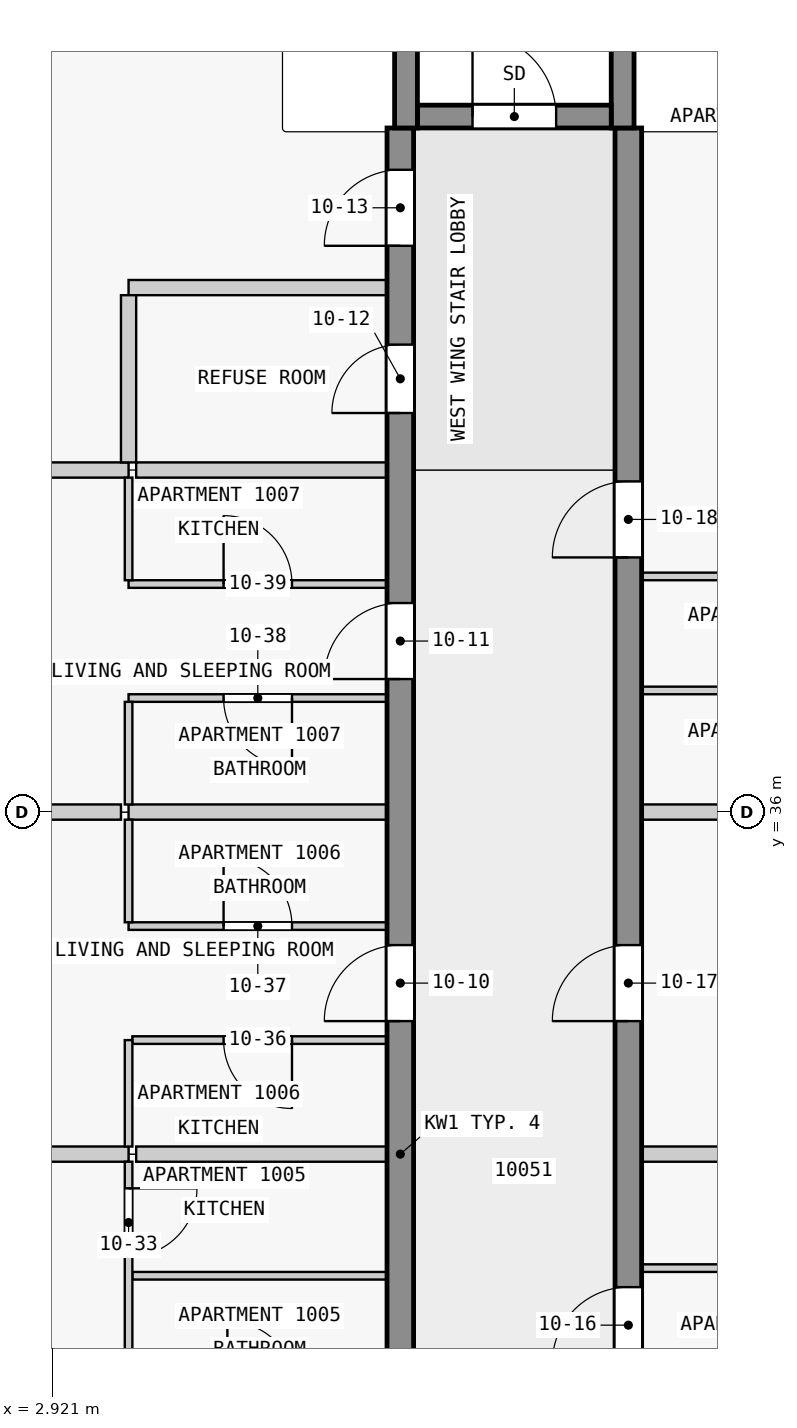
"""IFC4 building model, lengths in metres.
Left out: names, types, materials, properties, quantities, classifications, styles, units other than length and angle.
Written with IfcOpenShell. Run it as: python <this file> out.ifc"""

import sys

from ifc_helpers import new_model, si_unit, direction, frame, frame_2d, origin, place, context, subcontext, project, spatial, rectangle, extrude, element, fill, save


model = new_model("IFC4")
c1 = context("Model", 3, precision=1e-05, world=origin(), true_north=direction((0.0, 1.0)))
c2 = subcontext(c1, "Body", "Model", "MODEL_VIEW")
j1 = project(units=[si_unit("LENGTHUNIT", "METRE"), si_unit("PLANEANGLEUNIT", "RADIAN")], contexts=[c1])
p1 = place(None, origin())
s1 = spatial("IfcSite", under=j1, at=p1, CompositionType="ELEMENT")
p2 = place(p1, origin())
s2 = spatial("IfcBuilding", under=s1, at=p2, CompositionType="ELEMENT")
p3 = place(p2, frame((0.0, 0.0, 44.3)))
s3 = spatial("IfcBuildingStorey", under=s2, at=p3, CompositionType="ELEMENT", Elevation=44.3)
p4 = place(p3, frame((7.725, 45.15, 0.0), z_axis=(0.0, 0.0, 1.0), x_axis=(1.0, 0.0, 0.0)))
e1 = element("IfcWall", 1, at=p4, inside=s3, PredefinedType="SHEAR", context=c2, shape_type="SweptSolid", body=[
    extrude(rectangle(XDim=2.55, YDim=0.3, at=frame_2d((1.275, 0.0))), origin(), (0.0, 0.0, 1.0), 3.5),
])
p5 = place(p4, frame((0.725, 0.0, 0.0)))
e2 = element("IfcOpeningElement", 2, at=p5, cuts=e1, PredefinedType="OPENING", context=c2, shape_type="SweptSolid", body=[
    extrude(rectangle(XDim=1.1, YDim=2.1, at=frame_2d((0.55, 1.05))), frame((0.0, 0.16, 0.0), z_axis=(0.0, -1.0, 0.0), x_axis=(1.0, 0.0, 0.0)), (0.0, 0.0, 1.0), 0.32),
])
for number, where, z_axis, x_axis in (
    (3, (7.575, 45.0, 0.0), (0.0, 0.0, 1.0), (0.0, 1.0, 0.0)),
    (4, (10.425, 45.0, 0.0), (0.0, 0.0, 1.0), (0.0, 1.0, 0.0)),
):
    element("IfcWall", number, at=place(p3, frame(where, z_axis=z_axis, x_axis=x_axis)), inside=s3, PredefinedType="SHEAR", context=c2, shape_type="SweptSolid", body=[
        extrude(rectangle(XDim=7.2, YDim=0.3, at=frame_2d((3.6, 0.0))), origin(), (0.0, 0.0, 1.0), 3.5),
    ])
p6 = place(p3, frame((7.5, 18.0, 0.0), z_axis=(0.0, 0.0, 1.0), x_axis=(0.0, 1.0, 0.0)))
e5 = element("IfcWall", 5, at=p6, inside=s3, PredefinedType="SHEAR", context=c2, shape_type="SweptSolid", body=[
    extrude(rectangle(XDim=27.0, YDim=0.35, at=frame_2d((13.5, 0.0))), origin(), (0.0, 0.0, 1.0), 3.25),
])
p7 = place(p6, frame((4.75, 0.0, 0.0)))
e6 = element("IfcOpeningElement", 6, at=p7, cuts=e5, PredefinedType="OPENING", context=c2, shape_type="SweptSolid", body=[
    extrude(rectangle(XDim=1.0, YDim=2.1, at=frame_2d((0.5, 1.05))), frame((0.0, 0.185, 0.0), z_axis=(0.0, -1.0, 0.0), x_axis=(1.0, 0.0, 0.0)), (0.0, 0.0, 1.0), 0.37),
])
p8 = place(p6, frame((15.25, 0.0, 0.0)))
e7 = element("IfcOpeningElement", 7, at=p8, cuts=e5, PredefinedType="OPENING", context=c2, shape_type="SweptSolid", body=[
    extrude(rectangle(XDim=1.0, YDim=2.1, at=frame_2d((0.5, 1.05))), frame((0.0, 0.185, 0.0), z_axis=(0.0, -1.0, 0.0), x_axis=(1.0, 0.0, 0.0)), (0.0, 0.0, 1.0), 0.37),
])
p9 = place(p6, frame((19.75, 0.0, 0.0)))
e8 = element("IfcOpeningElement", 8, at=p9, cuts=e5, PredefinedType="OPENING", context=c2, shape_type="SweptSolid", body=[
    extrude(rectangle(XDim=1.0, YDim=2.1, at=frame_2d((0.5, 1.05))), frame((0.0, 0.185, 0.0), z_axis=(0.0, -1.0, 0.0), x_axis=(1.0, 0.0, 0.0)), (0.0, 0.0, 1.0), 0.37),
])
p10 = place(p6, frame((23.25, 0.0, 0.0)))
e9 = element("IfcOpeningElement", 9, at=p10, cuts=e5, PredefinedType="OPENING", context=c2, shape_type="SweptSolid", body=[
    extrude(rectangle(XDim=0.9, YDim=2.1, at=frame_2d((0.45, 1.05))), frame((0.0, 0.185, 0.0), z_axis=(0.0, -1.0, 0.0), x_axis=(1.0, 0.0, 0.0)), (0.0, 0.0, 1.0), 0.37),
])
p11 = place(p6, frame((25.45, 0.0, 0.0)))
e10 = element("IfcOpeningElement", 10, at=p11, cuts=e5, PredefinedType="OPENING", context=c2, shape_type="SweptSolid", body=[
    extrude(rectangle(XDim=1.0, YDim=2.1, at=frame_2d((0.5, 1.05))), frame((0.0, 0.185, 0.0), z_axis=(0.0, -1.0, 0.0), x_axis=(1.0, 0.0, 0.0)), (0.0, 0.0, 1.0), 0.37),
])
p12 = place(p3, frame((10.5, 18.0, 0.0), z_axis=(0.0, 0.0, 1.0), x_axis=(0.0, 1.0, 0.0)))
e11 = element("IfcWall", 11, at=p12, inside=s3, PredefinedType="SHEAR", context=c2, shape_type="SweptSolid", body=[
    extrude(rectangle(XDim=27.0, YDim=0.35, at=frame_2d((13.5, 0.0))), origin(), (0.0, 0.0, 1.0), 3.25),
])
p13 = place(p12, frame((1.75, 0.0, 0.0)))
e12 = element("IfcOpeningElement", 12, at=p13, cuts=e11, PredefinedType="OPENING", context=c2, shape_type="SweptSolid", body=[
    extrude(rectangle(XDim=1.0, YDim=2.1, at=frame_2d((0.5, 1.05))), frame((0.0, 0.185, 0.0), z_axis=(0.0, -1.0, 0.0), x_axis=(1.0, 0.0, 0.0)), (0.0, 0.0, 1.0), 0.37),
])
p14 = place(p12, frame((6.25, 0.0, 0.0)))
e13 = element("IfcOpeningElement", 13, at=p14, cuts=e11, PredefinedType="OPENING", context=c2, shape_type="SweptSolid", body=[
    extrude(rectangle(XDim=1.0, YDim=2.1, at=frame_2d((0.5, 1.05))), frame((0.0, 0.185, 0.0), z_axis=(0.0, -1.0, 0.0), x_axis=(1.0, 0.0, 0.0)), (0.0, 0.0, 1.0), 0.37),
])
p15 = place(p12, frame((10.75, 0.0, 0.0)))
e14 = element("IfcOpeningElement", 14, at=p15, cuts=e11, PredefinedType="OPENING", context=c2, shape_type="SweptSolid", body=[
    extrude(rectangle(XDim=1.0, YDim=2.1, at=frame_2d((0.5, 1.05))), frame((0.0, 0.185, 0.0), z_axis=(0.0, -1.0, 0.0), x_axis=(1.0, 0.0, 0.0)), (0.0, 0.0, 1.0), 0.37),
])
p16 = place(p12, frame((15.25, 0.0, 0.0)))
e15 = element("IfcOpeningElement", 15, at=p16, cuts=e11, PredefinedType="OPENING", context=c2, shape_type="SweptSolid", body=[
    extrude(rectangle(XDim=1.0, YDim=2.1, at=frame_2d((0.5, 1.05))), frame((0.0, 0.185, 0.0), z_axis=(0.0, -1.0, 0.0), x_axis=(1.0, 0.0, 0.0)), (0.0, 0.0, 1.0), 0.37),
])
p17 = place(p12, frame((21.35, 0.0, 0.0)))
e16 = element("IfcOpeningElement", 16, at=p17, cuts=e11, PredefinedType="OPENING", context=c2, shape_type="SweptSolid", body=[
    extrude(rectangle(XDim=1.0, YDim=2.1, at=frame_2d((0.5, 1.05))), frame((0.0, 0.185, 0.0), z_axis=(0.0, -1.0, 0.0), x_axis=(1.0, 0.0, 0.0)), (0.0, 0.0, 1.0), 0.37),
])
p18 = place(p3, frame((7.325, 29.9, 0.0), z_axis=(0.0, 0.0, 1.0), x_axis=(-1.0, 0.0, 0.0)))
e17 = element("IfcWall", 17, at=p18, inside=s3, PredefinedType="PARTITIONING", context=c2, shape_type="SweptSolid", body=[
    extrude(rectangle(XDim=3.35, YDim=0.1, at=frame_2d((1.675, 0.0))), origin(), (0.0, 0.0, 1.0), 3.25),
])
p19 = place(p3, frame((10.675, 30.0, 0.0), z_axis=(0.0, 0.0, 1.0), x_axis=(1.0, 0.0, 0.0)))
e18 = element("IfcWall", 18, at=p19, inside=s3, PredefinedType="PARTITIONING", context=c2, shape_type="SweptSolid", body=[
    extrude(rectangle(XDim=3.4, YDim=0.1, at=frame_2d((1.7, 0.0))), origin(), (0.0, 0.0, 1.0), 3.25),
])
p20 = place(p19, frame((1.25, 0.0, 0.0)))
e19 = element("IfcOpeningElement", 19, at=p20, cuts=e18, PredefinedType="OPENING", context=c2, shape_type="SweptSolid", body=[
    extrude(rectangle(XDim=0.9, YDim=2.1, at=frame_2d((0.45, 1.05))), frame((0.0, 0.06, 0.0), z_axis=(0.0, -1.0, 0.0), x_axis=(1.0, 0.0, 0.0)), (0.0, 0.0, 1.0), 0.12),
])
for number, where, z_axis, x_axis in (
    (20, (7.325, 31.5, 0.0), (0.0, 0.0, 1.0), (-1.0, 0.0, 0.0)),
    (21, (13.975, 31.5, 0.0), (0.0, 0.0, 1.0), (-1.0, 0.0, 0.0)),
):
    element("IfcWall", number, at=place(p3, frame(where, z_axis=z_axis, x_axis=x_axis)), inside=s3, PredefinedType="PARTITIONING", context=c2, shape_type="SweptSolid", body=[
        extrude(rectangle(XDim=3.3, YDim=0.2, at=frame_2d((1.65, 0.0))), origin(), (0.0, 0.0, 1.0), 3.25),
    ])
p21 = place(p3, frame((0.15, 31.5, 0.0), z_axis=(0.0, 0.0, 1.0), x_axis=(1.0, 0.0, 0.0)))
e22 = element("IfcWall", 22, at=p21, inside=s3, PredefinedType="PARTITIONING", context=c2, shape_type="SweptSolid", body=[
    extrude(rectangle(XDim=3.775, YDim=0.2, at=frame_2d((1.888, 0.0))), origin(), (0.0, 0.0, 1.0), 3.25),
])
p22 = place(p3, frame((7.325, 33.0, 0.0), z_axis=(0.0, 0.0, 1.0), x_axis=(-1.0, 0.0, 0.0)))
e23 = element("IfcWall", 23, at=p22, inside=s3, PredefinedType="PARTITIONING", context=c2, shape_type="SweptSolid", body=[
    extrude(rectangle(XDim=3.35, YDim=0.1, at=frame_2d((1.675, 0.0))), origin(), (0.0, 0.0, 1.0), 3.25),
])
p23 = place(p22, frame((1.25, 0.0, 0.0)))
e24 = element("IfcOpeningElement", 24, at=p23, cuts=e23, PredefinedType="OPENING", context=c2, shape_type="SweptSolid", body=[
    extrude(rectangle(XDim=0.9, YDim=2.1, at=frame_2d((0.45, 1.05))), frame((0.0, 0.06, 0.0), z_axis=(0.0, -1.0, 0.0), x_axis=(1.0, 0.0, 0.0)), (0.0, 0.0, 1.0), 0.12),
])
p24 = place(p3, frame((3.925, 34.5, 0.0), z_axis=(0.0, 0.0, 1.0), x_axis=(1.0, 0.0, 0.0)))
e25 = element("IfcWall", 25, at=p24, inside=s3, PredefinedType="PARTITIONING", context=c2, shape_type="SweptSolid", body=[
    extrude(rectangle(XDim=3.4, YDim=0.1, at=frame_2d((1.7, 0.0))), origin(), (0.0, 0.0, 1.0), 3.25),
])
p25 = place(p24, frame((1.25, 0.0, 0.0)))
e26 = element("IfcOpeningElement", 26, at=p25, cuts=e25, PredefinedType="OPENING", context=c2, shape_type="SweptSolid", body=[
    extrude(rectangle(XDim=0.9, YDim=2.1, at=frame_2d((0.45, 1.05))), frame((0.0, 0.06, 0.0), z_axis=(0.0, -1.0, 0.0), x_axis=(1.0, 0.0, 0.0)), (0.0, 0.0, 1.0), 0.12),
])
p26 = place(p3, frame((7.325, 36.0, 0.0), z_axis=(0.0, 0.0, 1.0), x_axis=(-1.0, 0.0, 0.0)))
e27 = element("IfcWall", 27, at=p26, inside=s3, PredefinedType="PARTITIONING", context=c2, shape_type="SweptSolid", body=[
    extrude(rectangle(XDim=3.4, YDim=0.2, at=frame_2d((1.7, 0.0))), origin(), (0.0, 0.0, 1.0), 3.25),
])
p27 = place(p3, frame((16.6, 36.0, 0.0), z_axis=(0.0, 0.0, 1.0), x_axis=(-1.0, 0.0, 0.0)))
e28 = element("IfcWall", 28, at=p27, inside=s3, PredefinedType="PARTITIONING", context=c2, shape_type="SweptSolid", body=[
    extrude(rectangle(XDim=5.925, YDim=0.2, at=frame_2d((2.962, 0.0))), origin(), (0.0, 0.0, 1.0), 3.25),
])
p28 = place(p3, frame((1.4, 36.0, 0.0), z_axis=(0.0, 0.0, 1.0), x_axis=(1.0, 0.0, 0.0)))
e29 = element("IfcWall", 29, at=p28, inside=s3, PredefinedType="PARTITIONING", context=c2, shape_type="SweptSolid", body=[
    extrude(rectangle(XDim=2.425, YDim=0.2, at=frame_2d((1.212, 0.0))), origin(), (0.0, 0.0, 1.0), 3.25),
])
p29 = place(p3, frame((7.325, 37.5, 0.0), z_axis=(0.0, 0.0, 1.0), x_axis=(-1.0, 0.0, 0.0)))
e30 = element("IfcWall", 30, at=p29, inside=s3, PredefinedType="PARTITIONING", context=c2, shape_type="SweptSolid", body=[
    extrude(rectangle(XDim=3.4, YDim=0.1, at=frame_2d((1.7, 0.0))), origin(), (0.0, 0.0, 1.0), 3.25),
])
p30 = place(p29, frame((1.25, 0.0, 0.0)))
e31 = element("IfcOpeningElement", 31, at=p30, cuts=e30, PredefinedType="OPENING", context=c2, shape_type="SweptSolid", body=[
    extrude(rectangle(XDim=0.9, YDim=2.1, at=frame_2d((0.45, 1.05))), frame((0.0, 0.06, 0.0), z_axis=(0.0, -1.0, 0.0), x_axis=(1.0, 0.0, 0.0)), (0.0, 0.0, 1.0), 0.12),
])
p31 = place(p3, frame((14.075, 37.6, 0.0), z_axis=(0.0, 0.0, 1.0), x_axis=(-1.0, 0.0, 0.0)))
e32 = element("IfcWall", 32, at=p31, inside=s3, PredefinedType="PARTITIONING", context=c2, shape_type="SweptSolid", body=[
    extrude(rectangle(XDim=3.4, YDim=0.1, at=frame_2d((1.7, 0.0))), origin(), (0.0, 0.0, 1.0), 3.25),
])
p32 = place(p3, frame((3.925, 39.0, 0.0), z_axis=(0.0, 0.0, 1.0), x_axis=(1.0, 0.0, 0.0)))
e33 = element("IfcWall", 33, at=p32, inside=s3, PredefinedType="PARTITIONING", context=c2, shape_type="SweptSolid", body=[
    extrude(rectangle(XDim=3.4, YDim=0.1, at=frame_2d((1.7, 0.0))), origin(), (0.0, 0.0, 1.0), 3.25),
])
p33 = place(p32, frame((1.25, 0.0, 0.0)))
e34 = element("IfcOpeningElement", 34, at=p33, cuts=e33, PredefinedType="OPENING", context=c2, shape_type="SweptSolid", body=[
    extrude(rectangle(XDim=0.9, YDim=2.1, at=frame_2d((0.45, 1.05))), frame((0.0, 0.06, 0.0), z_axis=(0.0, -1.0, 0.0), x_axis=(1.0, 0.0, 0.0)), (0.0, 0.0, 1.0), 0.12),
])
p34 = place(p3, frame((14.075, 39.1, 0.0), z_axis=(0.0, 0.0, 1.0), x_axis=(-1.0, 0.0, 0.0)))
e35 = element("IfcWall", 35, at=p34, inside=s3, PredefinedType="PARTITIONING", context=c2, shape_type="SweptSolid", body=[
    extrude(rectangle(XDim=3.4, YDim=0.1, at=frame_2d((1.7, 0.0))), origin(), (0.0, 0.0, 1.0), 3.25),
])
p35 = place(p34, frame((1.25, 0.0, 0.0)))
e36 = element("IfcOpeningElement", 36, at=p35, cuts=e35, PredefinedType="OPENING", context=c2, shape_type="SweptSolid", body=[
    extrude(rectangle(XDim=0.9, YDim=2.1, at=frame_2d((0.45, 1.05))), frame((0.0, 0.06, 0.0), z_axis=(0.0, -1.0, 0.0), x_axis=(1.0, 0.0, 0.0)), (0.0, 0.0, 1.0), 0.12),
])
p36 = place(p3, frame((7.325, 40.5, 0.0), z_axis=(0.0, 0.0, 1.0), x_axis=(-1.0, 0.0, 0.0)))
e37 = element("IfcWall", 37, at=p36, inside=s3, PredefinedType="PARTITIONING", context=c2, shape_type="SweptSolid", body=[
    extrude(rectangle(XDim=3.3, YDim=0.2, at=frame_2d((1.65, 0.0))), origin(), (0.0, 0.0, 1.0), 3.25),
])
p37 = place(p3, frame((-0.08, 40.5, 0.0), z_axis=(0.0, 0.0, 1.0), x_axis=(1.0, 0.0, 0.0)))
e38 = element("IfcWall", 38, at=p37, inside=s3, PredefinedType="PARTITIONING", context=c2, shape_type="SweptSolid", body=[
    extrude(rectangle(XDim=4.005, YDim=0.2, at=frame_2d((2.002, 0.0))), origin(), (0.0, 0.0, 1.0), 3.25),
])
p38 = place(p3, frame((7.325, 42.9, 0.0), z_axis=(0.0, 0.0, 1.0), x_axis=(-1.0, 0.0, 0.0)))
e39 = element("IfcWall", 39, at=p38, inside=s3, PredefinedType="PARTITIONING", context=c2, shape_type="SweptSolid", body=[
    extrude(rectangle(XDim=3.4, YDim=0.2, at=frame_2d((1.7, 0.0))), origin(), (0.0, 0.0, 1.0), 3.25),
])
p39 = place(p3, frame((3.925, 31.4, 0.0), z_axis=(0.0, 0.0, 1.0), x_axis=(0.0, -1.0, 0.0)))
e40 = element("IfcWall", 40, at=p39, inside=s3, PredefinedType="PARTITIONING", context=c2, shape_type="SweptSolid", body=[
    extrude(rectangle(XDim=3.0, YDim=0.1, at=frame_2d((1.5, 0.0))), origin(), (0.0, 0.0, 1.0), 3.25),
])
p40 = place(p39, frame((0.35, 0.0, 0.0)))
e41 = element("IfcOpeningElement", 41, at=p40, cuts=e40, PredefinedType="OPENING", context=c2, shape_type="SweptSolid", body=[
    extrude(rectangle(XDim=0.9, YDim=2.1, at=frame_2d((0.45, 1.05))), frame((0.0, 0.06, 0.0), z_axis=(0.0, -1.0, 0.0), x_axis=(1.0, 0.0, 0.0)), (0.0, 0.0, 1.0), 0.12),
])
p41 = place(p3, frame((3.925, 33.0, 0.0), z_axis=(0.0, 0.0, 1.0), x_axis=(0.0, -1.0, 0.0)))
e42 = element("IfcWall", 42, at=p41, inside=s3, PredefinedType="PARTITIONING", context=c2, shape_type="SweptSolid", body=[
    extrude(rectangle(XDim=1.4, YDim=0.1, at=frame_2d((0.7, 0.0))), origin(), (0.0, 0.0, 1.0), 3.25),
])
for number, where, z_axis, x_axis in (
    (43, (3.925, 35.9, 0.0), (0.0, 0.0, 1.0), (0.0, -1.0, 0.0)),
    (44, (3.925, 37.45, 0.0), (0.0, 0.0, 1.0), (0.0, -1.0, 0.0)),
    (45, (3.925, 40.4, 0.0), (0.0, 0.0, 1.0), (0.0, -1.0, 0.0)),
):
    element("IfcWall", number, at=place(p3, frame(where, z_axis=z_axis, x_axis=x_axis)), inside=s3, PredefinedType="PARTITIONING", context=c2, shape_type="SweptSolid", body=[
        extrude(rectangle(XDim=1.35, YDim=0.1, at=frame_2d((0.675, 0.0))), origin(), (0.0, 0.0, 1.0), 3.25),
    ])
p42 = place(p3, frame((3.925, 42.8, 0.0), z_axis=(0.0, 0.0, 1.0), x_axis=(0.0, -1.0, 0.0)))
e46 = element("IfcWall", 46, at=p42, inside=s3, PredefinedType="PARTITIONING", context=c2, shape_type="SweptSolid", body=[
    extrude(rectangle(XDim=2.2, YDim=0.2, at=frame_2d((1.1, 0.0))), origin(), (0.0, 0.0, 1.0), 3.25),
])
p43 = place(p5, origin())
e47 = element("IfcDoor", 47, at=p43, inside=s3, OperationType="SINGLE_SWING_LEFT", PredefinedType="DOOR", context=c2, shape_type="SweptSolid", body=[
    extrude(rectangle(XDim=1.1, YDim=2.1, at=frame_2d((0.55, 1.05))), frame((0.0, 0.025, 0.0), z_axis=(0.0, -1.0, 0.0), x_axis=(1.0, 0.0, 0.0)), (0.0, 0.0, 1.0), 0.05),
])
fill(e2, e47)
p44 = place(p8, origin())
e48 = element("IfcDoor", 48, at=p44, inside=s3, OperationType="SINGLE_SWING_RIGHT", PredefinedType="DOOR", context=c2, shape_type="SweptSolid", body=[
    extrude(rectangle(XDim=1.0, YDim=2.1, at=frame_2d((0.5, 1.05))), frame((0.0, 0.025, 0.0), z_axis=(0.0, -1.0, 0.0), x_axis=(1.0, 0.0, 0.0)), (0.0, 0.0, 1.0), 0.05),
])
fill(e7, e48)
p45 = place(p9, origin())
e49 = element("IfcDoor", 49, at=p45, inside=s3, OperationType="SINGLE_SWING_RIGHT", PredefinedType="DOOR", context=c2, shape_type="SweptSolid", body=[
    extrude(rectangle(XDim=1.0, YDim=2.1, at=frame_2d((0.5, 1.05))), frame((0.0, 0.025, 0.0), z_axis=(0.0, -1.0, 0.0), x_axis=(1.0, 0.0, 0.0)), (0.0, 0.0, 1.0), 0.05),
])
fill(e8, e49)
p46 = place(p10, origin())
e50 = element("IfcDoor", 50, at=p46, inside=s3, OperationType="SINGLE_SWING_RIGHT", PredefinedType="DOOR", context=c2, shape_type="SweptSolid", body=[
    extrude(rectangle(XDim=0.9, YDim=2.1, at=frame_2d((0.45, 1.05))), frame((0.0, 0.025, 0.0), z_axis=(0.0, -1.0, 0.0), x_axis=(1.0, 0.0, 0.0)), (0.0, 0.0, 1.0), 0.05),
])
fill(e9, e50)
p47 = place(p11, origin())
e51 = element("IfcDoor", 51, at=p47, inside=s3, OperationType="SINGLE_SWING_RIGHT", PredefinedType="DOOR", context=c2, shape_type="SweptSolid", body=[
    extrude(rectangle(XDim=1.0, YDim=2.1, at=frame_2d((0.5, 1.05))), frame((0.0, 0.025, 0.0), z_axis=(0.0, -1.0, 0.0), x_axis=(1.0, 0.0, 0.0)), (0.0, 0.0, 1.0), 0.05),
])
fill(e10, e51)
p48 = place(p15, origin())
e52 = element("IfcDoor", 52, at=p48, inside=s3, OperationType="SINGLE_SWING_LEFT", PredefinedType="DOOR", context=c2, shape_type="SweptSolid", body=[
    extrude(rectangle(XDim=1.0, YDim=2.1, at=frame_2d((0.5, 1.05))), frame((0.0, 0.025, 0.0), z_axis=(0.0, -1.0, 0.0), x_axis=(1.0, 0.0, 0.0)), (0.0, 0.0, 1.0), 0.05),
])
fill(e14, e52)
p49 = place(p16, origin())
e53 = element("IfcDoor", 53, at=p49, inside=s3, OperationType="SINGLE_SWING_RIGHT", PredefinedType="DOOR", context=c2, shape_type="SweptSolid", body=[
    extrude(rectangle(XDim=1.0, YDim=2.1, at=frame_2d((0.5, 1.05))), frame((0.0, 0.025, 0.0), z_axis=(0.0, -1.0, 0.0), x_axis=(1.0, 0.0, 0.0)), (0.0, 0.0, 1.0), 0.05),
])
fill(e15, e53)
p50 = place(p17, origin())
e54 = element("IfcDoor", 54, at=p50, inside=s3, OperationType="SINGLE_SWING_RIGHT", PredefinedType="DOOR", context=c2, shape_type="SweptSolid", body=[
    extrude(rectangle(XDim=1.0, YDim=2.1, at=frame_2d((0.5, 1.05))), frame((0.0, 0.025, 0.0), z_axis=(0.0, -1.0, 0.0), x_axis=(1.0, 0.0, 0.0)), (0.0, 0.0, 1.0), 0.05),
])
fill(e16, e54)
p51 = place(p40, origin())
e55 = element("IfcDoor", 55, at=p51, inside=s3, OperationType="SINGLE_SWING_LEFT", PredefinedType="DOOR", context=c2, shape_type="SweptSolid", body=[
    extrude(rectangle(XDim=0.9, YDim=2.1, at=frame_2d((0.45, 1.05))), frame((0.0, 0.025, 0.0), z_axis=(0.0, -1.0, 0.0), x_axis=(1.0, 0.0, 0.0)), (0.0, 0.0, 1.0), 0.05),
])
fill(e41, e55)
p52 = place(p23, origin())
e56 = element("IfcDoor", 56, at=p52, inside=s3, OperationType="SINGLE_SWING_RIGHT", PredefinedType="DOOR", context=c2, shape_type="SweptSolid", body=[
    extrude(rectangle(XDim=0.9, YDim=2.1, at=frame_2d((0.45, 1.05))), frame((0.0, 0.025, 0.0), z_axis=(0.0, -1.0, 0.0), x_axis=(1.0, 0.0, 0.0)), (0.0, 0.0, 1.0), 0.05),
])
fill(e24, e56)
p53 = place(p25, origin())
e57 = element("IfcDoor", 57, at=p53, inside=s3, OperationType="SINGLE_SWING_LEFT", PredefinedType="DOOR", context=c2, shape_type="SweptSolid", body=[
    extrude(rectangle(XDim=0.9, YDim=2.1, at=frame_2d((0.45, 1.05))), frame((0.0, 0.025, 0.0), z_axis=(0.0, -1.0, 0.0), x_axis=(1.0, 0.0, 0.0)), (0.0, 0.0, 1.0), 0.05),
])
fill(e26, e57)
p54 = place(p30, origin())
e58 = element("IfcDoor", 58, at=p54, inside=s3, OperationType="SINGLE_SWING_LEFT", PredefinedType="DOOR", context=c2, shape_type="SweptSolid", body=[
    extrude(rectangle(XDim=0.9, YDim=2.1, at=frame_2d((0.45, 1.05))), frame((0.0, 0.025, 0.0), z_axis=(0.0, -1.0, 0.0), x_axis=(1.0, 0.0, 0.0)), (0.0, 0.0, 1.0), 0.05),
])
fill(e31, e58)
p55 = place(p33, origin())
e59 = element("IfcDoor", 59, at=p55, inside=s3, OperationType="SINGLE_SWING_LEFT", PredefinedType="DOOR", context=c2, shape_type="SweptSolid", body=[
    extrude(rectangle(XDim=0.9, YDim=2.1, at=frame_2d((0.45, 1.05))), frame((0.0, 0.025, 0.0), z_axis=(0.0, -1.0, 0.0), x_axis=(1.0, 0.0, 0.0)), (0.0, 0.0, 1.0), 0.05),
])
fill(e34, e59)
save(model, sys.argv[1])
